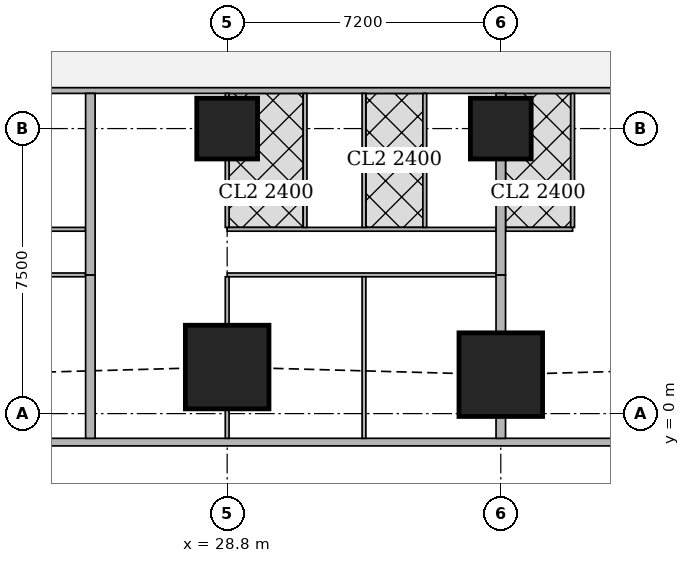
"""IFC4 building model, lengths in metres.
Left out: names, types, materials, properties, quantities, classifications, styles, units other than length and angle.
Written with IfcOpenShell. Run it as: python <this file> out.ifc"""

import sys

from ifc_helpers import new_model, si_unit, direction, frame, frame_2d, origin, origin_2d, place, context, subcontext, project, spatial, rectangle, extrude, element, fill, save


model = new_model("IFC4")
c1 = context("Model", 3, precision=1e-05, world=origin(), true_north=direction((0.0, 1.0)))
c2 = subcontext(c1, "Body", "Model", "MODEL_VIEW")
j1 = project(units=[si_unit("LENGTHUNIT", "METRE"), si_unit("PLANEANGLEUNIT", "RADIAN")], contexts=[c1])
p1 = place(None, origin())
s1 = spatial("IfcSite", under=j1, at=p1, CompositionType="ELEMENT")
p2 = place(p1, origin())
s2 = spatial("IfcBuilding", under=s1, at=p2, CompositionType="ELEMENT")
p3 = place(p2, frame((0.0, 0.0, 89.15)))
s3 = spatial("IfcBuildingStorey", under=s2, at=p3, CompositionType="ELEMENT", Elevation=89.15)
for number, where, z_axis, x_axis in (
    (1, (28.8, 1.225, 0.0), (0.0, 0.0, 1.0), (1.0, 0.0, 0.0)),
    (2, (36.0, 1.025, 0.0), (0.0, 0.0, 1.0), (1.0, 0.0, 0.0)),
):
    element("IfcColumn", number, at=place(p3, frame(where, z_axis=z_axis, x_axis=x_axis)), inside=s3, PredefinedType="COLUMN", context=c2, shape_type="SweptSolid", body=[
        extrude(rectangle(XDim=2.2, YDim=2.2, at=origin_2d()), origin(), (0.0, 0.0, 1.0), 3.75),
    ])
for number, where, z_axis, x_axis in (
    (3, (28.8, 7.5, 0.0), (0.0, 0.0, 1.0), (1.0, 0.0, 0.0)),
    (4, (36.0, 7.5, 0.0), (0.0, 0.0, 1.0), (1.0, 0.0, 0.0)),
):
    element("IfcColumn", number, at=place(p3, frame(where, z_axis=z_axis, x_axis=x_axis)), inside=s3, PredefinedType="COLUMN", context=c2, shape_type="SweptSolid", body=[
        extrude(rectangle(XDim=1.6, YDim=1.6, at=origin_2d()), origin(), (0.0, 0.0, 1.0), 3.75),
    ])
p4 = place(p3, frame((2.163, -0.75, 0.0), z_axis=(0.0, 0.0, 1.0), x_axis=(1.0, 0.0, 0.0)))
e5 = element("IfcWall", 5, at=p4, inside=s3, PredefinedType="SOLIDWALL", context=c2, shape_type="SweptSolid", body=[
    extrude(rectangle(XDim=45.628, YDim=0.2, at=frame_2d((22.814, 0.0))), origin(), (0.0, 0.0, 1.0), 3.5),
])
p5 = place(p4, frame((9.537, 0.0, 0.9)))
e6 = element("IfcOpeningElement", 6, at=p5, cuts=e5, PredefinedType="OPENING", context=c2, shape_type="SweptSolid", body=[
    extrude(rectangle(XDim=1.8, YDim=1.5, at=frame_2d((0.9, 0.75))), frame((0.0, 0.11, 0.0), z_axis=(0.0, -1.0, 0.0), x_axis=(1.0, 0.0, 0.0)), (0.0, 0.0, 1.0), 0.22),
])
p6 = place(p4, frame((13.137, 0.0, 0.9)))
e7 = element("IfcOpeningElement", 7, at=p6, cuts=e5, PredefinedType="OPENING", context=c2, shape_type="SweptSolid", body=[
    extrude(rectangle(XDim=1.8, YDim=1.5, at=frame_2d((0.9, 0.75))), frame((0.0, 0.11, 0.0), z_axis=(0.0, -1.0, 0.0), x_axis=(1.0, 0.0, 0.0)), (0.0, 0.0, 1.0), 0.22),
])
p7 = place(p4, frame((16.737, 0.0, 0.9)))
e8 = element("IfcOpeningElement", 8, at=p7, cuts=e5, PredefinedType="OPENING", context=c2, shape_type="SweptSolid", body=[
    extrude(rectangle(XDim=1.8, YDim=1.5, at=frame_2d((0.9, 0.75))), frame((0.0, 0.11, 0.0), z_axis=(0.0, -1.0, 0.0), x_axis=(1.0, 0.0, 0.0)), (0.0, 0.0, 1.0), 0.22),
])
p8 = place(p4, frame((20.337, 0.0, 0.9)))
e9 = element("IfcOpeningElement", 9, at=p8, cuts=e5, PredefinedType="OPENING", context=c2, shape_type="SweptSolid", body=[
    extrude(rectangle(XDim=1.8, YDim=1.5, at=frame_2d((0.9, 0.75))), frame((0.0, 0.11, 0.0), z_axis=(0.0, -1.0, 0.0), x_axis=(1.0, 0.0, 0.0)), (0.0, 0.0, 1.0), 0.22),
])
p9 = place(p4, frame((23.937, 0.0, 0.9)))
e10 = element("IfcOpeningElement", 10, at=p9, cuts=e5, PredefinedType="OPENING", context=c2, shape_type="SweptSolid", body=[
    extrude(rectangle(XDim=1.8, YDim=1.5, at=frame_2d((0.9, 0.75))), frame((0.0, 0.11, 0.0), z_axis=(0.0, -1.0, 0.0), x_axis=(1.0, 0.0, 0.0)), (0.0, 0.0, 1.0), 0.22),
])
p10 = place(p4, frame((27.537, 0.0, 0.9)))
e11 = element("IfcOpeningElement", 11, at=p10, cuts=e5, PredefinedType="OPENING", context=c2, shape_type="SweptSolid", body=[
    extrude(rectangle(XDim=1.8, YDim=1.5, at=frame_2d((0.9, 0.75))), frame((0.0, 0.11, 0.0), z_axis=(0.0, -1.0, 0.0), x_axis=(1.0, 0.0, 0.0)), (0.0, 0.0, 1.0), 0.22),
])
p11 = place(p4, frame((31.137, 0.0, 0.9)))
e12 = element("IfcOpeningElement", 12, at=p11, cuts=e5, PredefinedType="OPENING", context=c2, shape_type="SweptSolid", body=[
    extrude(rectangle(XDim=1.8, YDim=1.5, at=frame_2d((0.9, 0.75))), frame((0.0, 0.11, 0.0), z_axis=(0.0, -1.0, 0.0), x_axis=(1.0, 0.0, 0.0)), (0.0, 0.0, 1.0), 0.22),
])
p12 = place(p4, frame((34.737, 0.0, 0.9)))
e13 = element("IfcOpeningElement", 13, at=p12, cuts=e5, PredefinedType="OPENING", context=c2, shape_type="SweptSolid", body=[
    extrude(rectangle(XDim=1.8, YDim=1.5, at=frame_2d((0.9, 0.75))), frame((0.0, 0.11, 0.0), z_axis=(0.0, -1.0, 0.0), x_axis=(1.0, 0.0, 0.0)), (0.0, 0.0, 1.0), 0.22),
])
p13 = place(p3, frame((40.053, 8.5, 0.0), z_axis=(0.0, 0.0, 1.0), x_axis=(-1.0, 0.0, 0.0)))
e14 = element("IfcWall", 14, at=p13, inside=s3, PredefinedType="SOLIDWALL", context=c2, shape_type="SweptSolid", body=[
    extrude(rectangle(XDim=31.703, YDim=0.15, at=frame_2d((15.852, 0.0))), origin(), (0.0, 0.0, 1.0), 3.5),
])
p14 = place(p13, frame((28.103, 0.0, 0.0)))
e15 = element("IfcOpeningElement", 15, at=p14, cuts=e14, PredefinedType="OPENING", context=c2, shape_type="SweptSolid", body=[
    extrude(rectangle(XDim=1.0, YDim=2.1, at=frame_2d((0.5, 1.05))), frame((0.0, 0.085, 0.0), z_axis=(0.0, -1.0, 0.0), x_axis=(1.0, 0.0, 0.0)), (0.0, 0.0, 1.0), 0.17),
])
p15 = place(p13, frame((19.953, 0.0, 0.0)))
e16 = element("IfcOpeningElement", 16, at=p15, cuts=e14, PredefinedType="OPENING", context=c2, shape_type="SweptSolid", body=[
    extrude(rectangle(XDim=1.0, YDim=2.1, at=frame_2d((0.5, 1.05))), frame((0.0, 0.085, 0.0), z_axis=(0.0, -1.0, 0.0), x_axis=(1.0, 0.0, 0.0)), (0.0, 0.0, 1.0), 0.17),
])
p16 = place(p13, frame((12.753, 0.0, 0.0)))
e17 = element("IfcOpeningElement", 17, at=p16, cuts=e14, PredefinedType="OPENING", context=c2, shape_type="SweptSolid", body=[
    extrude(rectangle(XDim=1.0, YDim=2.1, at=frame_2d((0.5, 1.05))), frame((0.0, 0.085, 0.0), z_axis=(0.0, -1.0, 0.0), x_axis=(1.0, 0.0, 0.0)), (0.0, 0.0, 1.0), 0.17),
])
p17 = place(p13, frame((0.15, 0.0, 0.0)))
e18 = element("IfcOpeningElement", 18, at=p17, cuts=e14, PredefinedType="OPENING", context=c2, shape_type="SweptSolid", body=[
    extrude(rectangle(XDim=1.0, YDim=2.1, at=frame_2d((0.5, 1.05))), frame((0.0, 0.085, 0.0), z_axis=(0.0, -1.0, 0.0), x_axis=(1.0, 0.0, 0.0)), (0.0, 0.0, 1.0), 0.17),
])
p18 = place(p3, frame((33.127, 45.65, 0.0), z_axis=(0.0, 0.0, 1.0), x_axis=(0.185598547723, -0.98262565562, 0.0)))
e19 = element("IfcWall", 19, at=p18, inside=s3, PredefinedType="SOLIDWALL", context=c2, shape_type="SweptSolid", body=[
    extrude(rectangle(XDim=47.118, YDim=0.15, at=frame_2d((23.559, 0.0))), origin(), (0.0, 0.0, 1.0), 2.2),
])
p19 = place(p18, frame((15.285, 0.0, 0.0)))
e20 = element("IfcOpeningElement", 20, at=p19, cuts=e19, PredefinedType="OPENING", context=c2, shape_type="SweptSolid", body=[
    extrude(rectangle(XDim=1.0, YDim=2.1, at=frame_2d((0.5, 1.05))), frame((0.0, 0.085, 0.0), z_axis=(0.0, -1.0, 0.0), x_axis=(1.0, 0.0, 0.0)), (0.0, 0.0, 1.0), 0.17),
])
p20 = place(p18, frame((19.102, 0.0, 0.0)))
e21 = element("IfcOpeningElement", 21, at=p20, cuts=e19, PredefinedType="OPENING", context=c2, shape_type="SweptSolid", body=[
    extrude(rectangle(XDim=1.0, YDim=2.1, at=frame_2d((0.5, 1.05))), frame((0.0, 0.085, 0.0), z_axis=(0.0, -1.0, 0.0), x_axis=(1.0, 0.0, 0.0)), (0.0, 0.0, 1.0), 0.17),
])
p21 = place(p18, frame((33.88, 0.0, 0.0)))
e22 = element("IfcOpeningElement", 22, at=p21, cuts=e19, PredefinedType="OPENING", context=c2, shape_type="SweptSolid", body=[
    extrude(rectangle(XDim=1.0, YDim=2.1, at=frame_2d((0.5, 1.05))), frame((0.0, 0.085, 0.0), z_axis=(0.0, -1.0, 0.0), x_axis=(1.0, 0.0, 0.0)), (0.0, 0.0, 1.0), 0.17),
])
p22 = place(p3, frame((25.075, 3.65, 0.0), z_axis=(0.0, 0.0, 1.0), x_axis=(-1.0, 0.0, 0.0)))
e23 = element("IfcWall", 23, at=p22, inside=s3, PredefinedType="PARTITIONING", context=c2, shape_type="SweptSolid", body=[
    extrude(rectangle(XDim=3.475, YDim=0.1, at=frame_2d((1.737, 0.0))), origin(), (0.0, 0.0, 1.0), 3.5),
])
p23 = place(p22, frame((2.375, 0.0, 0.0)))
e24 = element("IfcOpeningElement", 24, at=p23, cuts=e23, PredefinedType="OPENING", context=c2, shape_type="SweptSolid", body=[
    extrude(rectangle(XDim=0.9, YDim=2.1, at=frame_2d((0.45, 1.05))), frame((0.0, 0.06, 0.0), z_axis=(0.0, -1.0, 0.0), x_axis=(1.0, 0.0, 0.0)), (0.0, 0.0, 1.0), 0.12),
])
p24 = place(p3, frame((25.075, 4.85, 0.0), z_axis=(0.0, 0.0, 1.0), x_axis=(-1.0, 0.0, 0.0)))
e25 = element("IfcWall", 25, at=p24, inside=s3, PredefinedType="PARTITIONING", context=c2, shape_type="SweptSolid", body=[
    extrude(rectangle(XDim=3.475, YDim=0.1, at=frame_2d((1.737, 0.0))), origin(), (0.0, 0.0, 1.0), 3.5),
])
p25 = place(p24, frame((2.0, 0.0, 0.0)))
e26 = element("IfcOpeningElement", 26, at=p25, cuts=e25, PredefinedType="OPENING", context=c2, shape_type="SweptSolid", body=[
    extrude(rectangle(XDim=0.9, YDim=2.1, at=frame_2d((0.45, 1.05))), frame((0.0, 0.06, 0.0), z_axis=(0.0, -1.0, 0.0), x_axis=(1.0, 0.0, 0.0)), (0.0, 0.0, 1.0), 0.12),
])
p26 = place(p24, frame((0.2, 0.0, 0.0)))
e27 = element("IfcOpeningElement", 27, at=p26, cuts=e25, PredefinedType="OPENING", context=c2, shape_type="SweptSolid", body=[
    extrude(rectangle(XDim=0.9, YDim=2.1, at=frame_2d((0.45, 1.05))), frame((0.0, 0.06, 0.0), z_axis=(0.0, -1.0, 0.0), x_axis=(1.0, 0.0, 0.0)), (0.0, 0.0, 1.0), 0.12),
])
p27 = place(p3, frame((35.875, 3.65, 0.0), z_axis=(0.0, 0.0, 1.0), x_axis=(-1.0, 0.0, 0.0)))
e28 = element("IfcWall", 28, at=p27, inside=s3, PredefinedType="PARTITIONING", context=c2, shape_type="SweptSolid", body=[
    extrude(rectangle(XDim=7.075, YDim=0.1, at=frame_2d((3.538, 0.0))), origin(), (0.0, 0.0, 1.0), 3.5),
])
p28 = place(p27, frame((5.975, 0.0, 0.0)))
e29 = element("IfcOpeningElement", 29, at=p28, cuts=e28, PredefinedType="OPENING", context=c2, shape_type="SweptSolid", body=[
    extrude(rectangle(XDim=0.9, YDim=2.1, at=frame_2d((0.45, 1.05))), frame((0.0, 0.06, 0.0), z_axis=(0.0, -1.0, 0.0), x_axis=(1.0, 0.0, 0.0)), (0.0, 0.0, 1.0), 0.12),
])
p29 = place(p27, frame((2.375, 0.0, 0.0)))
e30 = element("IfcOpeningElement", 30, at=p29, cuts=e28, PredefinedType="OPENING", context=c2, shape_type="SweptSolid", body=[
    extrude(rectangle(XDim=0.9, YDim=2.1, at=frame_2d((0.45, 1.05))), frame((0.0, 0.06, 0.0), z_axis=(0.0, -1.0, 0.0), x_axis=(1.0, 0.0, 0.0)), (0.0, 0.0, 1.0), 0.12),
])
p30 = place(p3, frame((35.875, 4.85, 0.0), z_axis=(0.0, 0.0, 1.0), x_axis=(-1.0, 0.0, 0.0)))
e31 = element("IfcWall", 31, at=p30, inside=s3, PredefinedType="PARTITIONING", context=c2, shape_type="SweptSolid", body=[
    extrude(rectangle(XDim=7.075, YDim=0.1, at=frame_2d((3.538, 0.0))), origin(), (0.0, 0.0, 1.0), 3.5),
])
p31 = place(p30, frame((5.6, 0.0, 0.0)))
e32 = element("IfcOpeningElement", 32, at=p31, cuts=e31, PredefinedType="OPENING", context=c2, shape_type="SweptSolid", body=[
    extrude(rectangle(XDim=0.9, YDim=2.1, at=frame_2d((0.45, 1.05))), frame((0.0, 0.06, 0.0), z_axis=(0.0, -1.0, 0.0), x_axis=(1.0, 0.0, 0.0)), (0.0, 0.0, 1.0), 0.12),
])
p32 = place(p30, frame((2.225, 0.0, 0.0)))
e33 = element("IfcOpeningElement", 33, at=p32, cuts=e31, PredefinedType="OPENING", context=c2, shape_type="SweptSolid", body=[
    extrude(rectangle(XDim=0.9, YDim=2.1, at=frame_2d((0.45, 1.05))), frame((0.0, 0.06, 0.0), z_axis=(0.0, -1.0, 0.0), x_axis=(1.0, 0.0, 0.0)), (0.0, 0.0, 1.0), 0.12),
])
p33 = place(p30, frame((3.8, 0.0, 0.0)))
e34 = element("IfcOpeningElement", 34, at=p33, cuts=e31, PredefinedType="OPENING", context=c2, shape_type="SweptSolid", body=[
    extrude(rectangle(XDim=0.9, YDim=2.1, at=frame_2d((0.45, 1.05))), frame((0.0, 0.06, 0.0), z_axis=(0.0, -1.0, 0.0), x_axis=(1.0, 0.0, 0.0)), (0.0, 0.0, 1.0), 0.12),
])
p34 = place(p30, frame((0.425, 0.0, 0.0)))
e35 = element("IfcOpeningElement", 35, at=p34, cuts=e31, PredefinedType="OPENING", context=c2, shape_type="SweptSolid", body=[
    extrude(rectangle(XDim=0.9, YDim=2.1, at=frame_2d((0.45, 1.05))), frame((0.0, 0.06, 0.0), z_axis=(0.0, -1.0, 0.0), x_axis=(1.0, 0.0, 0.0)), (0.0, 0.0, 1.0), 0.12),
])
p35 = place(p3, frame((28.8, -0.65, 0.0), z_axis=(0.0, 0.0, 1.0), x_axis=(0.0, 1.0, 0.0)))
e36 = element("IfcWall", 36, at=p35, inside=s3, PredefinedType="PARTITIONING", context=c2, shape_type="SweptSolid", body=[
    extrude(rectangle(XDim=0.774, YDim=0.1, at=frame_2d((0.387, 0.0))), origin(), (0.0, 0.0, 1.0), 3.5),
])
p36 = place(p3, frame((28.8, 2.326, 0.0), z_axis=(0.0, 0.0, 1.0), x_axis=(0.0, 1.0, 0.0)))
e37 = element("IfcWall", 37, at=p36, inside=s3, PredefinedType="PARTITIONING", context=c2, shape_type="SweptSolid", body=[
    extrude(rectangle(XDim=1.274, YDim=0.1, at=frame_2d((0.637, 0.0))), origin(), (0.0, 0.0, 1.0), 3.5),
])
p37 = place(p3, frame((32.4, -0.65, 0.0), z_axis=(0.0, 0.0, 1.0), x_axis=(0.0, 1.0, 0.0)))
e38 = element("IfcWall", 38, at=p37, inside=s3, PredefinedType="PARTITIONING", context=c2, shape_type="SweptSolid", body=[
    extrude(rectangle(XDim=4.25, YDim=0.1, at=frame_2d((2.125, 0.0))), origin(), (0.0, 0.0, 1.0), 2.2),
])
p38 = place(p3, frame((28.8, 4.9, 0.0), z_axis=(0.0, 0.0, 1.0), x_axis=(0.0, 1.0, 0.0)))
e39 = element("IfcWall", 39, at=p38, inside=s3, PredefinedType="PARTITIONING", context=c2, shape_type="SweptSolid", body=[
    extrude(rectangle(XDim=1.799, YDim=0.1, at=frame_2d((0.899, 0.0))), origin(), (0.0, 0.0, 1.0), 3.5),
])
p39 = place(p3, frame((28.8, 8.301, 0.0), z_axis=(0.0, 0.0, 1.0), x_axis=(0.0, 1.0, 0.0)))
e40 = element("IfcWall", 40, at=p39, inside=s3, PredefinedType="PARTITIONING", context=c2, shape_type="SweptSolid", body=[
    extrude(rectangle(XDim=0.124, YDim=0.1, at=frame_2d((0.062, 0.0))), origin(), (0.0, 0.0, 1.0), 3.5),
])
for number, where, z_axis, x_axis in (
    (41, (32.4, 4.9, 0.0), (0.0, 0.0, 1.0), (0.0, 1.0, 0.0)),
    (42, (30.85, 4.9, 0.0), (0.0, 0.0, 1.0), (0.0, 1.0, 0.0)),
    (43, (34.0, 4.9, 0.0), (0.0, 0.0, 1.0), (0.0, 1.0, 0.0)),
):
    element("IfcWall", number, at=place(p3, frame(where, z_axis=z_axis, x_axis=x_axis)), inside=s3, PredefinedType="PARTITIONING", context=c2, shape_type="SweptSolid", body=[
        extrude(rectangle(XDim=3.525, YDim=0.1, at=frame_2d((1.763, 0.0))), origin(), (0.0, 0.0, 1.0), 3.5),
    ])
p40 = place(p3, frame((25.2, -0.65, 0.0), z_axis=(0.0, 0.0, 1.0), x_axis=(0.0, 1.0, 0.0)))
e44 = element("IfcWall", 44, at=p40, inside=s3, PredefinedType="SOLIDWALL", context=c2, shape_type="SweptSolid", body=[
    extrude(rectangle(XDim=4.3, YDim=0.25, at=frame_2d((2.15, 0.0))), origin(), (0.0, 0.0, 1.0), 2.2),
])
p41 = place(p3, frame((25.2, 3.65, 0.0), z_axis=(0.0, 0.0, 1.0), x_axis=(0.0, 1.0, 0.0)))
e45 = element("IfcWall", 45, at=p41, inside=s3, PredefinedType="SOLIDWALL", context=c2, shape_type="SweptSolid", body=[
    extrude(rectangle(XDim=4.775, YDim=0.25, at=frame_2d((2.388, 0.0))), origin(), (0.0, 0.0, 1.0), 3.5),
])
p42 = place(p3, frame((37.89, 4.85, 0.0), z_axis=(0.0, 0.0, 1.0), x_axis=(-1.0, 0.0, 0.0)))
e46 = element("IfcWall", 46, at=p42, inside=s3, PredefinedType="PARTITIONING", context=c2, shape_type="SweptSolid", body=[
    extrude(rectangle(XDim=1.765, YDim=0.1, at=frame_2d((0.882, 0.0))), origin(), (0.0, 0.0, 1.0), 3.5),
])
p43 = place(p42, frame((0.49, 0.0, 0.0)))
e47 = element("IfcOpeningElement", 47, at=p43, cuts=e46, PredefinedType="OPENING", context=c2, shape_type="SweptSolid", body=[
    extrude(rectangle(XDim=0.9, YDim=2.1, at=frame_2d((0.45, 1.05))), frame((0.0, 0.06, 0.0), z_axis=(0.0, -1.0, 0.0), x_axis=(1.0, 0.0, 0.0)), (0.0, 0.0, 1.0), 0.12),
])
p44 = place(p3, frame((37.89, 4.9, 0.0), z_axis=(0.0, 0.0, 1.0), x_axis=(0.0, 1.0, 0.0)))
e48 = element("IfcWall", 48, at=p44, inside=s3, PredefinedType="PARTITIONING", context=c2, shape_type="SweptSolid", body=[
    extrude(rectangle(XDim=3.525, YDim=0.1, at=frame_2d((1.763, 0.0))), origin(), (0.0, 0.0, 1.0), 3.5),
])
p45 = place(p3, frame((36.0, -0.65, 0.0), z_axis=(0.0, 0.0, 1.0), x_axis=(0.0, 1.0, 0.0)))
e49 = element("IfcWall", 49, at=p45, inside=s3, PredefinedType="SOLIDWALL", context=c2, shape_type="SweptSolid", body=[
    extrude(rectangle(XDim=0.574, YDim=0.25, at=frame_2d((0.287, 0.0))), origin(), (0.0, 0.0, 1.0), 3.5),
])
p46 = place(p3, frame((36.0, 2.126, 0.0), z_axis=(0.0, 0.0, 1.0), x_axis=(0.0, 1.0, 0.0)))
e50 = element("IfcWall", 50, at=p46, inside=s3, PredefinedType="SOLIDWALL", context=c2, shape_type="SweptSolid", body=[
    extrude(rectangle(XDim=1.524, YDim=0.25, at=frame_2d((0.762, 0.0))), origin(), (0.0, 0.0, 1.0), 3.5),
])
p47 = place(p3, frame((36.0, 3.65, 0.0), z_axis=(0.0, 0.0, 1.0), x_axis=(0.0, 1.0, 0.0)))
e51 = element("IfcWall", 51, at=p47, inside=s3, PredefinedType="SOLIDWALL", context=c2, shape_type="SweptSolid", body=[
    extrude(rectangle(XDim=3.049, YDim=0.25, at=frame_2d((1.524, 0.0))), origin(), (0.0, 0.0, 1.0), 3.5),
])
p48 = place(p3, frame((36.0, 8.301, 0.0), z_axis=(0.0, 0.0, 1.0), x_axis=(0.0, 1.0, 0.0)))
e52 = element("IfcWall", 52, at=p48, inside=s3, PredefinedType="SOLIDWALL", context=c2, shape_type="SweptSolid", body=[
    extrude(rectangle(XDim=0.124, YDim=0.25, at=frame_2d((0.062, 0.0))), origin(), (0.0, 0.0, 1.0), 3.5),
])
p49 = place(p8, origin())
e53 = element("IfcWindow", 53, at=p49, inside=s3, PartitioningType="SINGLE_PANEL", PredefinedType="WINDOW", context=c2, shape_type="SweptSolid", body=[
    extrude(rectangle(XDim=1.8, YDim=1.5, at=frame_2d((0.9, 0.75))), frame((0.0, 0.03, 0.0), z_axis=(0.0, -1.0, 0.0), x_axis=(1.0, 0.0, 0.0)), (0.0, 0.0, 1.0), 0.06),
])
fill(e9, e53)
p50 = place(p9, origin())
e54 = element("IfcWindow", 54, at=p50, inside=s3, PartitioningType="SINGLE_PANEL", PredefinedType="WINDOW", context=c2, shape_type="SweptSolid", body=[
    extrude(rectangle(XDim=1.8, YDim=1.5, at=frame_2d((0.9, 0.75))), frame((0.0, 0.03, 0.0), z_axis=(0.0, -1.0, 0.0), x_axis=(1.0, 0.0, 0.0)), (0.0, 0.0, 1.0), 0.06),
])
fill(e10, e54)
p51 = place(p10, origin())
e55 = element("IfcWindow", 55, at=p51, inside=s3, PartitioningType="SINGLE_PANEL", PredefinedType="WINDOW", context=c2, shape_type="SweptSolid", body=[
    extrude(rectangle(XDim=1.8, YDim=1.5, at=frame_2d((0.9, 0.75))), frame((0.0, 0.03, 0.0), z_axis=(0.0, -1.0, 0.0), x_axis=(1.0, 0.0, 0.0)), (0.0, 0.0, 1.0), 0.06),
])
fill(e11, e55)
p52 = place(p11, origin())
e56 = element("IfcWindow", 56, at=p52, inside=s3, PartitioningType="SINGLE_PANEL", PredefinedType="WINDOW", context=c2, shape_type="SweptSolid", body=[
    extrude(rectangle(XDim=1.8, YDim=1.5, at=frame_2d((0.9, 0.75))), frame((0.0, 0.03, 0.0), z_axis=(0.0, -1.0, 0.0), x_axis=(1.0, 0.0, 0.0)), (0.0, 0.0, 1.0), 0.06),
])
fill(e12, e56)
p53 = place(p12, origin())
e57 = element("IfcWindow", 57, at=p53, inside=s3, PartitioningType="SINGLE_PANEL", PredefinedType="WINDOW", context=c2, shape_type="SweptSolid", body=[
    extrude(rectangle(XDim=1.8, YDim=1.5, at=frame_2d((0.9, 0.75))), frame((0.0, 0.03, 0.0), z_axis=(0.0, -1.0, 0.0), x_axis=(1.0, 0.0, 0.0)), (0.0, 0.0, 1.0), 0.06),
])
fill(e13, e57)
p54 = place(p26, origin())
e58 = element("IfcDoor", 58, at=p54, inside=s3, OperationType="SINGLE_SWING_RIGHT", PredefinedType="DOOR", context=c2, shape_type="SweptSolid", body=[
    extrude(rectangle(XDim=0.9, YDim=2.1, at=frame_2d((0.45, 1.05))), frame((0.0, 0.025, 0.0), z_axis=(0.0, -1.0, 0.0), x_axis=(1.0, 0.0, 0.0)), (0.0, 0.0, 1.0), 0.05),
])
fill(e27, e58)
p55 = place(p28, origin())
e59 = element("IfcDoor", 59, at=p55, inside=s3, OperationType="SINGLE_SWING_RIGHT", PredefinedType="DOOR", context=c2, shape_type="SweptSolid", body=[
    extrude(rectangle(XDim=0.9, YDim=2.1, at=frame_2d((0.45, 1.05))), frame((0.0, 0.025, 0.0), z_axis=(0.0, -1.0, 0.0), x_axis=(1.0, 0.0, 0.0)), (0.0, 0.0, 1.0), 0.05),
])
fill(e29, e59)
p56 = place(p29, origin())
e60 = element("IfcDoor", 60, at=p56, inside=s3, OperationType="SINGLE_SWING_RIGHT", PredefinedType="DOOR", context=c2, shape_type="SweptSolid", body=[
    extrude(rectangle(XDim=0.9, YDim=2.1, at=frame_2d((0.45, 1.05))), frame((0.0, 0.025, 0.0), z_axis=(0.0, -1.0, 0.0), x_axis=(1.0, 0.0, 0.0)), (0.0, 0.0, 1.0), 0.05),
])
fill(e30, e60)
p57 = place(p31, origin())
e61 = element("IfcDoor", 61, at=p57, inside=s3, OperationType="SINGLE_SWING_LEFT", PredefinedType="DOOR", context=c2, shape_type="SweptSolid", body=[
    extrude(rectangle(XDim=0.9, YDim=2.1, at=frame_2d((0.45, 1.05))), frame((0.0, 0.025, 0.0), z_axis=(0.0, -1.0, 0.0), x_axis=(1.0, 0.0, 0.0)), (0.0, 0.0, 1.0), 0.05),
])
fill(e32, e61)
p58 = place(p32, origin())
e62 = element("IfcDoor", 62, at=p58, inside=s3, OperationType="SINGLE_SWING_LEFT", PredefinedType="DOOR", context=c2, shape_type="SweptSolid", body=[
    extrude(rectangle(XDim=0.9, YDim=2.1, at=frame_2d((0.45, 1.05))), frame((0.0, 0.025, 0.0), z_axis=(0.0, -1.0, 0.0), x_axis=(1.0, 0.0, 0.0)), (0.0, 0.0, 1.0), 0.05),
])
fill(e33, e62)
p59 = place(p33, origin())
e63 = element("IfcDoor", 63, at=p59, inside=s3, OperationType="SINGLE_SWING_LEFT", PredefinedType="DOOR", context=c2, shape_type="SweptSolid", body=[
    extrude(rectangle(XDim=0.9, YDim=2.1, at=frame_2d((0.45, 1.05))), frame((0.0, 0.025, 0.0), z_axis=(0.0, -1.0, 0.0), x_axis=(1.0, 0.0, 0.0)), (0.0, 0.0, 1.0), 0.05),
])
fill(e34, e63)
p60 = place(p34, origin())
e64 = element("IfcDoor", 64, at=p60, inside=s3, OperationType="SINGLE_SWING_RIGHT", PredefinedType="DOOR", context=c2, shape_type="SweptSolid", body=[
    extrude(rectangle(XDim=0.9, YDim=2.1, at=frame_2d((0.45, 1.05))), frame((0.0, 0.025, 0.0), z_axis=(0.0, -1.0, 0.0), x_axis=(1.0, 0.0, 0.0)), (0.0, 0.0, 1.0), 0.05),
])
fill(e35, e64)
p61 = place(p16, origin())
e65 = element("IfcDoor", 65, at=p61, inside=s3, OperationType="SINGLE_SWING_RIGHT", PredefinedType="DOOR", context=c2, shape_type="SweptSolid", body=[
    extrude(rectangle(XDim=1.0, YDim=2.1, at=frame_2d((0.5, 1.05))), frame((0.0, 0.025, 0.0), z_axis=(0.0, -1.0, 0.0), x_axis=(1.0, 0.0, 0.0)), (0.0, 0.0, 1.0), 0.05),
])
fill(e17, e65)
p62 = place(p43, origin())
e66 = element("IfcDoor", 66, at=p62, inside=s3, OperationType="SINGLE_SWING_LEFT", PredefinedType="DOOR", context=c2, shape_type="SweptSolid", body=[
    extrude(rectangle(XDim=0.9, YDim=2.1, at=frame_2d((0.45, 1.05))), frame((0.0, 0.025, 0.0), z_axis=(0.0, -1.0, 0.0), x_axis=(1.0, 0.0, 0.0)), (0.0, 0.0, 1.0), 0.05),
])
fill(e47, e66)
save(model, sys.argv[1])
